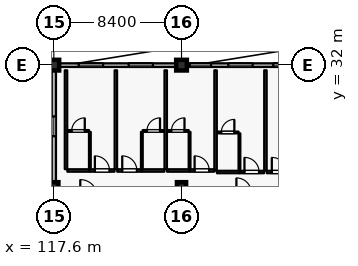
"""IFC4 building model, lengths in metres.
Left out: names, types, materials, properties, quantities, classifications, styles, units other than length and angle.
Written with IfcOpenShell. Run it as: python <this file> out.ifc"""

import sys

from ifc_helpers import new_model, si_unit, direction, frame, frame_2d, origin, origin_2d, place, context, subcontext, project, spatial, rectangle, extrude, element, fill, save


model = new_model("IFC4")
c1 = context("Model", 3, precision=1e-05, world=origin(), true_north=direction((0.0, 1.0)))
c2 = subcontext(c1, "Body", "Model", "MODEL_VIEW")
j1 = project(units=[si_unit("LENGTHUNIT", "METRE"), si_unit("PLANEANGLEUNIT", "RADIAN")], contexts=[c1])
p1 = place(None, origin())
s1 = spatial("IfcSite", under=j1, at=p1, CompositionType="ELEMENT")
p2 = place(p1, origin())
s2 = spatial("IfcBuilding", under=s1, at=p2, CompositionType="ELEMENT")
p3 = place(p2, frame((0.0, 0.0, 36.0)))
s3 = spatial("IfcBuildingStorey", under=s2, at=p3, CompositionType="ELEMENT", Elevation=36.0)
for number, where, z_axis, x_axis in (
    (1, (117.6, 32.0, 0.0), (0.0, 0.0, 1.0), (1.0, 0.0, 0.0)),
    (2, (126.0, 32.0, 0.0), (0.0, 0.0, 1.0), (1.0, 0.0, 0.0)),
):
    element("IfcColumn", number, at=place(p3, frame(where, z_axis=z_axis, x_axis=x_axis)), inside=s3, PredefinedType="COLUMN", context=c2, shape_type="SweptSolid", body=[
        extrude(rectangle(XDim=0.7, YDim=0.7, at=origin_2d()), origin(), (0.0, 0.0, 1.0), 3.6),
    ])
for number, where, z_axis, x_axis in (
    (3, (117.6, 24.0, 0.0), (0.0, 0.0, 1.0), (1.0, 0.0, 0.0)),
    (4, (126.0, 24.0, 0.0), (0.0, 0.0, 1.0), (1.0, 0.0, 0.0)),
):
    element("IfcColumn", number, at=place(p3, frame(where, z_axis=z_axis, x_axis=x_axis)), inside=s3, PredefinedType="COLUMN", context=c2, shape_type="SweptSolid", body=[
        extrude(rectangle(XDim=0.6, YDim=0.6, at=origin_2d()), origin(), (0.0, 0.0, 1.0), 3.6),
    ])
p4 = place(p3, frame((117.95, 32.0, 0.0), z_axis=(0.0, 0.0, 1.0), x_axis=(1.0, 0.0, 0.0)))
e5 = element("IfcWall", 5, at=p4, inside=s3, PredefinedType="SOLIDWALL", context=c2, shape_type="SweptSolid", body=[
    extrude(rectangle(XDim=7.7, YDim=0.24, at=frame_2d((3.85, 0.0))), origin(), (0.0, 0.0, 1.0), 2.94),
])
p5 = place(p4, frame((1.29, 0.0, 0.8)))
e6 = element("IfcOpeningElement", 6, at=p5, cuts=e5, PredefinedType="OPENING", context=c2, shape_type="SweptSolid", body=[
    extrude(rectangle(XDim=1.6, YDim=1.6, at=frame_2d((0.8, 0.8))), frame((0.0, 0.13, 0.0), z_axis=(0.0, -1.0, 0.0), x_axis=(1.0, 0.0, 0.0)), (0.0, 0.0, 1.0), 0.26),
])
p6 = place(p4, frame((4.57, 0.0, 0.8)))
e7 = element("IfcOpeningElement", 7, at=p6, cuts=e5, PredefinedType="OPENING", context=c2, shape_type="SweptSolid", body=[
    extrude(rectangle(XDim=1.6, YDim=1.6, at=frame_2d((0.8, 0.8))), frame((0.0, 0.13, 0.0), z_axis=(0.0, -1.0, 0.0), x_axis=(1.0, 0.0, 0.0)), (0.0, 0.0, 1.0), 0.26),
])
p7 = place(p3, frame((126.35, 32.0, 0.0), z_axis=(0.0, 0.0, 1.0), x_axis=(1.0, 0.0, 0.0)))
e8 = element("IfcWall", 8, at=p7, inside=s3, PredefinedType="SOLIDWALL", context=c2, shape_type="SweptSolid", body=[
    extrude(rectangle(XDim=7.7, YDim=0.24, at=frame_2d((3.85, 0.0))), origin(), (0.0, 0.0, 1.0), 2.94),
])
p8 = place(p7, frame((0.195, 0.0, 0.8)))
e9 = element("IfcOpeningElement", 9, at=p8, cuts=e8, PredefinedType="OPENING", context=c2, shape_type="SweptSolid", body=[
    extrude(rectangle(XDim=1.4, YDim=1.6, at=frame_2d((0.7, 0.8))), frame((0.0, 0.13, 0.0), z_axis=(0.0, -1.0, 0.0), x_axis=(1.0, 0.0, 0.0)), (0.0, 0.0, 1.0), 0.26),
])
p9 = place(p7, frame((2.73, 0.0, 0.8)))
e10 = element("IfcOpeningElement", 10, at=p9, cuts=e8, PredefinedType="OPENING", context=c2, shape_type="SweptSolid", body=[
    extrude(rectangle(XDim=1.6, YDim=1.6, at=frame_2d((0.8, 0.8))), frame((0.0, 0.13, 0.0), z_axis=(0.0, -1.0, 0.0), x_axis=(1.0, 0.0, 0.0)), (0.0, 0.0, 1.0), 0.26),
])
p10 = place(p7, frame((5.685, 0.0, 0.8)))
e11 = element("IfcOpeningElement", 11, at=p10, cuts=e8, PredefinedType="OPENING", context=c2, shape_type="SweptSolid", body=[
    extrude(rectangle(XDim=1.6, YDim=1.6, at=frame_2d((0.8, 0.8))), frame((0.0, 0.13, 0.0), z_axis=(0.0, -1.0, 0.0), x_axis=(1.0, 0.0, 0.0)), (0.0, 0.0, 1.0), 0.26),
])
p11 = place(p3, frame((117.6, 24.3, 0.0), z_axis=(0.0, 0.0, 1.0), x_axis=(0.0, 1.0, 0.0)))
e12 = element("IfcWall", 12, at=p11, inside=s3, PredefinedType="SOLIDWALL", context=c2, shape_type="SweptSolid", body=[
    extrude(rectangle(XDim=7.35, YDim=0.28, at=frame_2d((3.675, 0.0))), origin(), (0.0, 0.0, 1.0), 2.7),
])
p12 = place(p11, frame((3.025, 0.0, 0.5)))
e13 = element("IfcOpeningElement", 13, at=p12, cuts=e12, PredefinedType="OPENING", context=c2, shape_type="SweptSolid", body=[
    extrude(rectangle(XDim=1.3, YDim=1.65, at=frame_2d((0.65, 0.825))), frame((0.0, 0.15, 0.0), z_axis=(0.0, -1.0, 0.0), x_axis=(1.0, 0.0, 0.0)), (0.0, 0.0, 1.0), 0.3),
])
p13 = place(p3, frame((118.49, 25.07, 0.0), z_axis=(0.0, 0.0, 1.0), x_axis=(1.0, 0.0, 0.0)))
e14 = element("IfcWall", 14, at=p13, inside=s3, PredefinedType="PARTITIONING", context=c2, shape_type="SweptSolid", body=[
    extrude(rectangle(XDim=1.47, YDim=0.16, at=frame_2d((0.735, 0.0))), origin(), (0.0, 0.0, 1.0), 3.365),
])
p14 = place(p3, frame((119.97, 25.07, 0.0), z_axis=(0.0, 0.0, 1.0), x_axis=(1.0, 0.0, 0.0)))
e15 = element("IfcWall", 15, at=p14, inside=s3, PredefinedType="PARTITIONING", context=c2, shape_type="SweptSolid", body=[
    extrude(rectangle(XDim=1.62, YDim=0.16, at=frame_2d((0.81, 0.0))), origin(), (0.0, 0.0, 1.0), 3.365),
])
p15 = place(p14, frame((0.33, 0.0, 0.0)))
e16 = element("IfcOpeningElement", 16, at=p15, cuts=e15, PredefinedType="OPENING", context=c2, shape_type="SweptSolid", body=[
    extrude(rectangle(XDim=0.96, YDim=2.2, at=frame_2d((0.48, 1.1))), frame((0.0, 0.09, 0.0), z_axis=(0.0, -1.0, 0.0), x_axis=(1.0, 0.0, 0.0)), (0.0, 0.0, 1.0), 0.18),
])
p16 = place(p3, frame((119.97, 25.16, 0.0), z_axis=(0.0, 0.0, 1.0), x_axis=(0.0, 1.0, 0.0)))
e17 = element("IfcWall", 17, at=p16, inside=s3, PredefinedType="PARTITIONING", context=c2, shape_type="SweptSolid", body=[
    extrude(rectangle(XDim=2.45, YDim=0.115, at=frame_2d((1.225, 0.0))), origin(), (0.0, 0.0, 1.0), 3.365),
])
p17 = place(p3, frame((118.5, 27.67, 0.0), z_axis=(0.0, 0.0, 1.0), x_axis=(1.0, 0.0, 0.0)))
e18 = element("IfcWall", 18, at=p17, inside=s3, PredefinedType="PARTITIONING", context=c2, shape_type="SweptSolid", body=[
    extrude(rectangle(XDim=1.41, YDim=0.115, at=frame_2d((0.705, 0.0))), origin(), (0.0, 0.0, 1.0), 3.365),
])
p18 = place(p17, frame((0.275, 0.0, 0.0)))
e19 = element("IfcOpeningElement", 19, at=p18, cuts=e18, PredefinedType="OPENING", context=c2, shape_type="SweptSolid", body=[
    extrude(rectangle(XDim=0.86, YDim=2.12, at=frame_2d((0.43, 1.06))), frame((0.0, 0.067, 0.0), z_axis=(0.0, -1.0, 0.0), x_axis=(1.0, 0.0, 0.0)), (0.0, 0.0, 1.0), 0.135),
])
p19 = place(p3, frame((118.4, 25.16, 0.0), z_axis=(0.0, 0.0, 1.0), x_axis=(0.0, 1.0, 0.0)))
e20 = element("IfcWall", 20, at=p19, inside=s3, PredefinedType="PARTITIONING", context=c2, shape_type="SweptSolid", body=[
    extrude(rectangle(XDim=6.5, YDim=0.16, at=frame_2d((3.25, 0.0))), origin(), (0.0, 0.0, 1.0), 3.365),
])
p20 = place(p3, frame((121.77, 25.07, 0.0), z_axis=(0.0, 0.0, 1.0), x_axis=(1.0, 0.0, 0.0)))
e21 = element("IfcWall", 21, at=p20, inside=s3, PredefinedType="PARTITIONING", context=c2, shape_type="SweptSolid", body=[
    extrude(rectangle(XDim=1.62, YDim=0.16, at=frame_2d((0.81, 0.0))), origin(), (0.0, 0.0, 1.0), 3.365),
])
p21 = place(p20, frame((0.33, 0.0, 0.0)))
e22 = element("IfcOpeningElement", 22, at=p21, cuts=e21, PredefinedType="OPENING", context=c2, shape_type="SweptSolid", body=[
    extrude(rectangle(XDim=0.96, YDim=2.2, at=frame_2d((0.48, 1.1))), frame((0.0, 0.09, 0.0), z_axis=(0.0, -1.0, 0.0), x_axis=(1.0, 0.0, 0.0)), (0.0, 0.0, 1.0), 0.18),
])
p22 = place(p3, frame((123.4, 25.07, 0.0), z_axis=(0.0, 0.0, 1.0), x_axis=(1.0, 0.0, 0.0)))
e23 = element("IfcWall", 23, at=p22, inside=s3, PredefinedType="PARTITIONING", context=c2, shape_type="SweptSolid", body=[
    extrude(rectangle(XDim=1.47, YDim=0.16, at=frame_2d((0.735, 0.0))), origin(), (0.0, 0.0, 1.0), 3.365),
])
p23 = place(p3, frame((123.39, 25.16, 0.0), z_axis=(0.0, 0.0, 1.0), x_axis=(0.0, 1.0, 0.0)))
e24 = element("IfcWall", 24, at=p23, inside=s3, PredefinedType="PARTITIONING", context=c2, shape_type="SweptSolid", body=[
    extrude(rectangle(XDim=2.45, YDim=0.115, at=frame_2d((1.225, 0.0))), origin(), (0.0, 0.0, 1.0), 3.365),
])
p24 = place(p3, frame((123.45, 27.67, 0.0), z_axis=(0.0, 0.0, 1.0), x_axis=(1.0, 0.0, 0.0)))
e25 = element("IfcWall", 25, at=p24, inside=s3, PredefinedType="PARTITIONING", context=c2, shape_type="SweptSolid", body=[
    extrude(rectangle(XDim=1.41, YDim=0.115, at=frame_2d((0.705, 0.0))), origin(), (0.0, 0.0, 1.0), 3.365),
])
p25 = place(p24, frame((0.275, 0.0, 0.0)))
e26 = element("IfcOpeningElement", 26, at=p25, cuts=e25, PredefinedType="OPENING", context=c2, shape_type="SweptSolid", body=[
    extrude(rectangle(XDim=0.86, YDim=2.12, at=frame_2d((0.43, 1.06))), frame((0.0, 0.067, 0.0), z_axis=(0.0, -1.0, 0.0), x_axis=(1.0, 0.0, 0.0)), (0.0, 0.0, 1.0), 0.135),
])
p26 = place(p3, frame((121.68, 25.16, 0.0), z_axis=(0.0, 0.0, 1.0), x_axis=(0.0, 1.0, 0.0)))
e27 = element("IfcWall", 27, at=p26, inside=s3, PredefinedType="PARTITIONING", context=c2, shape_type="SweptSolid", body=[
    extrude(rectangle(XDim=6.5, YDim=0.16, at=frame_2d((3.25, 0.0))), origin(), (0.0, 0.0, 1.0), 3.365),
])
p27 = place(p3, frame((125.05, 25.07, 0.0), z_axis=(0.0, 0.0, 1.0), x_axis=(1.0, 0.0, 0.0)))
e28 = element("IfcWall", 28, at=p27, inside=s3, PredefinedType="PARTITIONING", context=c2, shape_type="SweptSolid", body=[
    extrude(rectangle(XDim=1.47, YDim=0.16, at=frame_2d((0.735, 0.0))), origin(), (0.0, 0.0, 1.0), 3.365),
])
p28 = place(p3, frame((126.53, 25.07, 0.0), z_axis=(0.0, 0.0, 1.0), x_axis=(1.0, 0.0, 0.0)))
e29 = element("IfcWall", 29, at=p28, inside=s3, PredefinedType="PARTITIONING", context=c2, shape_type="SweptSolid", body=[
    extrude(rectangle(XDim=1.62, YDim=0.16, at=frame_2d((0.81, 0.0))), origin(), (0.0, 0.0, 1.0), 3.365),
])
p29 = place(p28, frame((0.33, 0.0, 0.0)))
e30 = element("IfcOpeningElement", 30, at=p29, cuts=e29, PredefinedType="OPENING", context=c2, shape_type="SweptSolid", body=[
    extrude(rectangle(XDim=0.96, YDim=2.2, at=frame_2d((0.48, 1.1))), frame((0.0, 0.09, 0.0), z_axis=(0.0, -1.0, 0.0), x_axis=(1.0, 0.0, 0.0)), (0.0, 0.0, 1.0), 0.18),
])
p30 = place(p3, frame((126.53, 25.16, 0.0), z_axis=(0.0, 0.0, 1.0), x_axis=(0.0, 1.0, 0.0)))
e31 = element("IfcWall", 31, at=p30, inside=s3, PredefinedType="PARTITIONING", context=c2, shape_type="SweptSolid", body=[
    extrude(rectangle(XDim=2.45, YDim=0.115, at=frame_2d((1.225, 0.0))), origin(), (0.0, 0.0, 1.0), 3.365),
])
p31 = place(p3, frame((125.06, 27.67, 0.0), z_axis=(0.0, 0.0, 1.0), x_axis=(1.0, 0.0, 0.0)))
e32 = element("IfcWall", 32, at=p31, inside=s3, PredefinedType="PARTITIONING", context=c2, shape_type="SweptSolid", body=[
    extrude(rectangle(XDim=1.41, YDim=0.115, at=frame_2d((0.705, 0.0))), origin(), (0.0, 0.0, 1.0), 3.365),
])
p32 = place(p31, frame((0.275, 0.0, 0.0)))
e33 = element("IfcOpeningElement", 33, at=p32, cuts=e32, PredefinedType="OPENING", context=c2, shape_type="SweptSolid", body=[
    extrude(rectangle(XDim=0.86, YDim=2.12, at=frame_2d((0.43, 1.06))), frame((0.0, 0.067, 0.0), z_axis=(0.0, -1.0, 0.0), x_axis=(1.0, 0.0, 0.0)), (0.0, 0.0, 1.0), 0.135),
])
p33 = place(p3, frame((124.96, 25.16, 0.0), z_axis=(0.0, 0.0, 1.0), x_axis=(0.0, 1.0, 0.0)))
e34 = element("IfcWall", 34, at=p33, inside=s3, PredefinedType="PARTITIONING", context=c2, shape_type="SweptSolid", body=[
    extrude(rectangle(XDim=6.5, YDim=0.16, at=frame_2d((3.25, 0.0))), origin(), (0.0, 0.0, 1.0), 3.365),
])
p34 = place(p3, frame((128.33, 24.97, 0.0), z_axis=(0.0, 0.0, 1.0), x_axis=(1.0, 0.0, 0.0)))
e35 = element("IfcWall", 35, at=p34, inside=s3, PredefinedType="PARTITIONING", context=c2, shape_type="SweptSolid", body=[
    extrude(rectangle(XDim=1.47, YDim=0.16, at=frame_2d((0.735, 0.0))), origin(), (0.0, 0.0, 1.0), 3.365),
])
p35 = place(p3, frame((129.81, 24.97, 0.0), z_axis=(0.0, 0.0, 1.0), x_axis=(1.0, 0.0, 0.0)))
e36 = element("IfcWall", 36, at=p35, inside=s3, PredefinedType="PARTITIONING", context=c2, shape_type="SweptSolid", body=[
    extrude(rectangle(XDim=1.62, YDim=0.16, at=frame_2d((0.81, 0.0))), origin(), (0.0, 0.0, 1.0), 3.365),
])
p36 = place(p35, frame((0.33, 0.0, 0.0)))
e37 = element("IfcOpeningElement", 37, at=p36, cuts=e36, PredefinedType="OPENING", context=c2, shape_type="SweptSolid", body=[
    extrude(rectangle(XDim=0.96, YDim=2.2, at=frame_2d((0.48, 1.1))), frame((0.0, 0.09, 0.0), z_axis=(0.0, -1.0, 0.0), x_axis=(1.0, 0.0, 0.0)), (0.0, 0.0, 1.0), 0.18),
])
p37 = place(p3, frame((129.81, 25.06, 0.0), z_axis=(0.0, 0.0, 1.0), x_axis=(0.0, 1.0, 0.0)))
e38 = element("IfcWall", 38, at=p37, inside=s3, PredefinedType="PARTITIONING", context=c2, shape_type="SweptSolid", body=[
    extrude(rectangle(XDim=2.45, YDim=0.115, at=frame_2d((1.225, 0.0))), origin(), (0.0, 0.0, 1.0), 3.365),
])
p38 = place(p3, frame((128.34, 27.57, 0.0), z_axis=(0.0, 0.0, 1.0), x_axis=(1.0, 0.0, 0.0)))
e39 = element("IfcWall", 39, at=p38, inside=s3, PredefinedType="PARTITIONING", context=c2, shape_type="SweptSolid", body=[
    extrude(rectangle(XDim=1.41, YDim=0.115, at=frame_2d((0.705, 0.0))), origin(), (0.0, 0.0, 1.0), 3.365),
])
p39 = place(p38, frame((0.275, 0.0, 0.0)))
e40 = element("IfcOpeningElement", 40, at=p39, cuts=e39, PredefinedType="OPENING", context=c2, shape_type="SweptSolid", body=[
    extrude(rectangle(XDim=0.86, YDim=2.12, at=frame_2d((0.43, 1.06))), frame((0.0, 0.067, 0.0), z_axis=(0.0, -1.0, 0.0), x_axis=(1.0, 0.0, 0.0)), (0.0, 0.0, 1.0), 0.135),
])
p40 = place(p3, frame((128.24, 25.06, 0.0), z_axis=(0.0, 0.0, 1.0), x_axis=(0.0, 1.0, 0.0)))
e41 = element("IfcWall", 41, at=p40, inside=s3, PredefinedType="PARTITIONING", context=c2, shape_type="SweptSolid", body=[
    extrude(rectangle(XDim=6.6, YDim=0.16, at=frame_2d((3.3, 0.0))), origin(), (0.0, 0.0, 1.0), 3.365),
])
p41 = place(p3, frame((131.61, 24.97, 0.0), z_axis=(0.0, 0.0, 1.0), x_axis=(1.0, 0.0, 0.0)))
e42 = element("IfcWall", 42, at=p41, inside=s3, PredefinedType="PARTITIONING", context=c2, shape_type="SweptSolid", body=[
    extrude(rectangle(XDim=1.62, YDim=0.16, at=frame_2d((0.81, 0.0))), origin(), (0.0, 0.0, 1.0), 3.365),
])
p42 = place(p41, frame((0.33, 0.0, 0.0)))
e43 = element("IfcOpeningElement", 43, at=p42, cuts=e42, PredefinedType="OPENING", context=c2, shape_type="SweptSolid", body=[
    extrude(rectangle(XDim=0.96, YDim=2.2, at=frame_2d((0.48, 1.1))), frame((0.0, 0.09, 0.0), z_axis=(0.0, -1.0, 0.0), x_axis=(1.0, 0.0, 0.0)), (0.0, 0.0, 1.0), 0.18),
])
p43 = place(p3, frame((131.52, 25.06, 0.0), z_axis=(0.0, 0.0, 1.0), x_axis=(0.0, 1.0, 0.0)))
e44 = element("IfcWall", 44, at=p43, inside=s3, PredefinedType="PARTITIONING", context=c2, shape_type="SweptSolid", body=[
    extrude(rectangle(XDim=6.6, YDim=0.16, at=frame_2d((3.3, 0.0))), origin(), (0.0, 0.0, 1.0), 3.365),
])
p44 = place(p5, origin())
e45 = element("IfcWindow", 45, at=p44, inside=s3, PartitioningType="SINGLE_PANEL", PredefinedType="WINDOW", context=c2, shape_type="SweptSolid", body=[
    extrude(rectangle(XDim=1.6, YDim=1.6, at=frame_2d((0.8, 0.8))), frame((0.0, 0.03, 0.0), z_axis=(0.0, -1.0, 0.0), x_axis=(1.0, 0.0, 0.0)), (0.0, 0.0, 1.0), 0.06),
])
fill(e6, e45)
p45 = place(p6, origin())
e46 = element("IfcWindow", 46, at=p45, inside=s3, PartitioningType="SINGLE_PANEL", PredefinedType="WINDOW", context=c2, shape_type="SweptSolid", body=[
    extrude(rectangle(XDim=1.6, YDim=1.6, at=frame_2d((0.8, 0.8))), frame((0.0, 0.03, 0.0), z_axis=(0.0, -1.0, 0.0), x_axis=(1.0, 0.0, 0.0)), (0.0, 0.0, 1.0), 0.06),
])
fill(e7, e46)
p46 = place(p8, origin())
e47 = element("IfcWindow", 47, at=p46, inside=s3, PartitioningType="SINGLE_PANEL", PredefinedType="WINDOW", context=c2, shape_type="SweptSolid", body=[
    extrude(rectangle(XDim=1.4, YDim=1.6, at=frame_2d((0.7, 0.8))), frame((0.0, 0.03, 0.0), z_axis=(0.0, -1.0, 0.0), x_axis=(1.0, 0.0, 0.0)), (0.0, 0.0, 1.0), 0.06),
])
fill(e9, e47)
p47 = place(p9, origin())
e48 = element("IfcWindow", 48, at=p47, inside=s3, PartitioningType="SINGLE_PANEL", PredefinedType="WINDOW", context=c2, shape_type="SweptSolid", body=[
    extrude(rectangle(XDim=1.6, YDim=1.6, at=frame_2d((0.8, 0.8))), frame((0.0, 0.03, 0.0), z_axis=(0.0, -1.0, 0.0), x_axis=(1.0, 0.0, 0.0)), (0.0, 0.0, 1.0), 0.06),
])
fill(e10, e48)
p48 = place(p10, origin())
e49 = element("IfcWindow", 49, at=p48, inside=s3, PartitioningType="SINGLE_PANEL", PredefinedType="WINDOW", context=c2, shape_type="SweptSolid", body=[
    extrude(rectangle(XDim=1.6, YDim=1.6, at=frame_2d((0.8, 0.8))), frame((0.0, 0.03, 0.0), z_axis=(0.0, -1.0, 0.0), x_axis=(1.0, 0.0, 0.0)), (0.0, 0.0, 1.0), 0.06),
])
fill(e11, e49)
p49 = place(p12, origin())
e50 = element("IfcWindow", 50, at=p49, inside=s3, PartitioningType="SINGLE_PANEL", PredefinedType="WINDOW", context=c2, shape_type="SweptSolid", body=[
    extrude(rectangle(XDim=1.3, YDim=1.65, at=frame_2d((0.65, 0.825))), frame((0.0, 0.03, 0.0), z_axis=(0.0, -1.0, 0.0), x_axis=(1.0, 0.0, 0.0)), (0.0, 0.0, 1.0), 0.06),
])
fill(e13, e50)
p50 = place(p15, origin())
e51 = element("IfcDoor", 51, at=p50, inside=s3, OperationType="SINGLE_SWING_LEFT", PredefinedType="DOOR", context=c2, shape_type="SweptSolid", body=[
    extrude(rectangle(XDim=0.96, YDim=2.2, at=frame_2d((0.48, 1.1))), frame((0.0, 0.025, 0.0), z_axis=(0.0, -1.0, 0.0), x_axis=(1.0, 0.0, 0.0)), (0.0, 0.0, 1.0), 0.05),
])
fill(e16, e51)
p51 = place(p18, origin())
e52 = element("IfcDoor", 52, at=p51, inside=s3, OperationType="SINGLE_SWING_RIGHT", PredefinedType="DOOR", context=c2, shape_type="SweptSolid", body=[
    extrude(rectangle(XDim=0.86, YDim=2.12, at=frame_2d((0.43, 1.06))), frame((0.0, 0.025, 0.0), z_axis=(0.0, -1.0, 0.0), x_axis=(1.0, 0.0, 0.0)), (0.0, 0.0, 1.0), 0.05),
])
fill(e19, e52)
p52 = place(p21, origin())
e53 = element("IfcDoor", 53, at=p52, inside=s3, OperationType="SINGLE_SWING_LEFT", PredefinedType="DOOR", context=c2, shape_type="SweptSolid", body=[
    extrude(rectangle(XDim=0.96, YDim=2.2, at=frame_2d((0.48, 1.1))), frame((0.0, 0.025, 0.0), z_axis=(0.0, -1.0, 0.0), x_axis=(1.0, 0.0, 0.0)), (0.0, 0.0, 1.0), 0.05),
])
fill(e22, e53)
p53 = place(p25, origin())
e54 = element("IfcDoor", 54, at=p53, inside=s3, OperationType="SINGLE_SWING_RIGHT", PredefinedType="DOOR", context=c2, shape_type="SweptSolid", body=[
    extrude(rectangle(XDim=0.86, YDim=2.12, at=frame_2d((0.43, 1.06))), frame((0.0, 0.025, 0.0), z_axis=(0.0, -1.0, 0.0), x_axis=(1.0, 0.0, 0.0)), (0.0, 0.0, 1.0), 0.05),
])
fill(e26, e54)
p54 = place(p29, origin())
e55 = element("IfcDoor", 55, at=p54, inside=s3, OperationType="SINGLE_SWING_LEFT", PredefinedType="DOOR", context=c2, shape_type="SweptSolid", body=[
    extrude(rectangle(XDim=0.96, YDim=2.2, at=frame_2d((0.48, 1.1))), frame((0.0, 0.025, 0.0), z_axis=(0.0, -1.0, 0.0), x_axis=(1.0, 0.0, 0.0)), (0.0, 0.0, 1.0), 0.05),
])
fill(e30, e55)
p55 = place(p32, origin())
e56 = element("IfcDoor", 56, at=p55, inside=s3, OperationType="SINGLE_SWING_RIGHT", PredefinedType="DOOR", context=c2, shape_type="SweptSolid", body=[
    extrude(rectangle(XDim=0.86, YDim=2.12, at=frame_2d((0.43, 1.06))), frame((0.0, 0.025, 0.0), z_axis=(0.0, -1.0, 0.0), x_axis=(1.0, 0.0, 0.0)), (0.0, 0.0, 1.0), 0.05),
])
fill(e33, e56)
p56 = place(p36, origin())
e57 = element("IfcDoor", 57, at=p56, inside=s3, OperationType="SINGLE_SWING_LEFT", PredefinedType="DOOR", context=c2, shape_type="SweptSolid", body=[
    extrude(rectangle(XDim=0.96, YDim=2.2, at=frame_2d((0.48, 1.1))), frame((0.0, 0.025, 0.0), z_axis=(0.0, -1.0, 0.0), x_axis=(1.0, 0.0, 0.0)), (0.0, 0.0, 1.0), 0.05),
])
fill(e37, e57)
p57 = place(p39, origin())
e58 = element("IfcDoor", 58, at=p57, inside=s3, OperationType="SINGLE_SWING_RIGHT", PredefinedType="DOOR", context=c2, shape_type="SweptSolid", body=[
    extrude(rectangle(XDim=0.86, YDim=2.12, at=frame_2d((0.43, 1.06))), frame((0.0, 0.025, 0.0), z_axis=(0.0, -1.0, 0.0), x_axis=(1.0, 0.0, 0.0)), (0.0, 0.0, 1.0), 0.05),
])
fill(e40, e58)
p58 = place(p42, origin())
e59 = element("IfcDoor", 59, at=p58, inside=s3, OperationType="SINGLE_SWING_LEFT", PredefinedType="DOOR", context=c2, shape_type="SweptSolid", body=[
    extrude(rectangle(XDim=0.96, YDim=2.2, at=frame_2d((0.48, 1.1))), frame((0.0, 0.025, 0.0), z_axis=(0.0, -1.0, 0.0), x_axis=(1.0, 0.0, 0.0)), (0.0, 0.0, 1.0), 0.05),
])
fill(e43, e59)
save(model, sys.argv[1])
